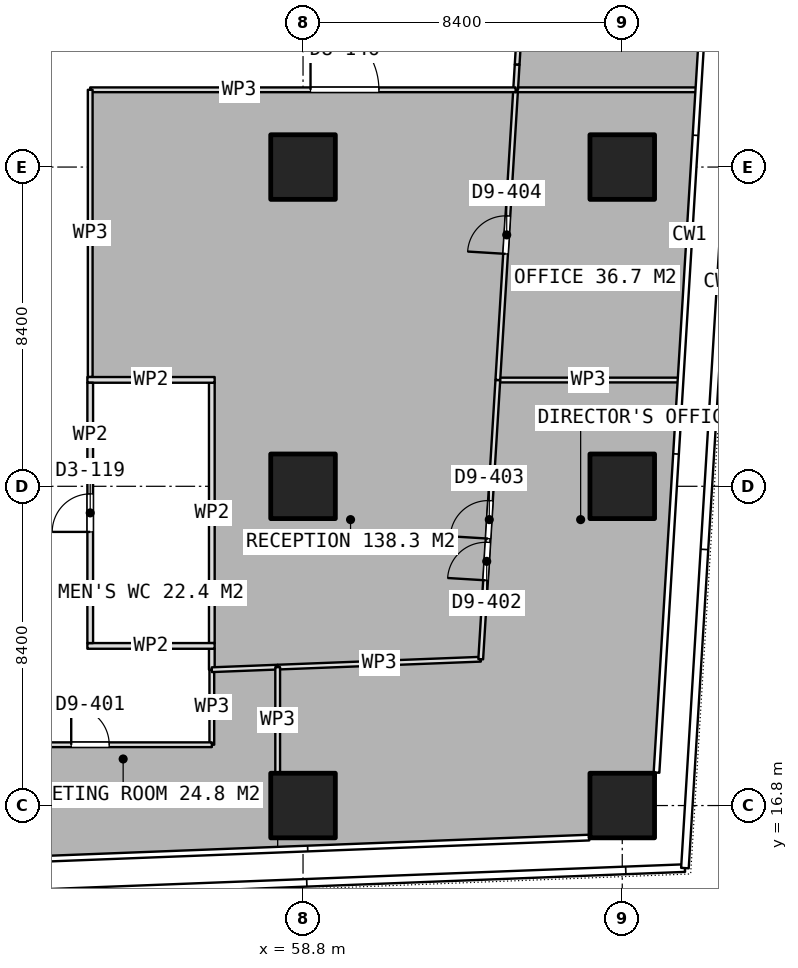
"""IFC4 building model, lengths in metres.
Left out: names, types, materials, properties, quantities, classifications, styles, units other than length and angle.
Written with IfcOpenShell. Run it as: python <this file> out.ifc"""

import sys

from ifc_helpers import new_model, si_unit, direction, frame, frame_2d, origin, origin_2d, place, context, subcontext, project, spatial, rectangle, extrude, element, fill, save


model = new_model("IFC4")
c1 = context("Model", 3, precision=1e-05, world=origin(), true_north=direction((0.0, 1.0)))
c2 = subcontext(c1, "Body", "Model", "MODEL_VIEW")
j1 = project(units=[si_unit("LENGTHUNIT", "METRE"), si_unit("PLANEANGLEUNIT", "RADIAN")], contexts=[c1])
p1 = place(None, origin())
s1 = spatial("IfcSite", under=j1, at=p1, CompositionType="ELEMENT")
p2 = place(p1, origin())
s2 = spatial("IfcBuilding", under=s1, at=p2, CompositionType="ELEMENT")
p3 = place(p2, frame((0.0, 0.0, 114.05)))
s3 = spatial("IfcBuildingStorey", under=s2, at=p3, CompositionType="ELEMENT", Elevation=114.05)
for number, where, z_axis, x_axis in (
    (1, (58.8, 16.8, 0.0), (0.0, 0.0, 1.0), (1.0, 0.0, 0.0)),
    (2, (58.8, 25.2, 0.0), (0.0, 0.0, 1.0), (1.0, 0.0, 0.0)),
    (3, (58.8, 33.6, 0.0), (0.0, 0.0, 1.0), (1.0, 0.0, 0.0)),
    (4, (67.2, 16.8, 0.0), (0.0, 0.0, 1.0), (1.0, 0.0, 0.0)),
    (5, (67.2, 25.2, 0.0), (0.0, 0.0, 1.0), (1.0, 0.0, 0.0)),
    (6, (67.2, 33.6, 0.0), (0.0, 0.0, 1.0), (1.0, 0.0, 0.0)),
):
    element("IfcColumn", number, at=place(p3, frame(where, z_axis=z_axis, x_axis=x_axis)), inside=s3, PredefinedType="COLUMN", context=c2, shape_type="SweptSolid", body=[
        extrude(rectangle(XDim=1.7, YDim=1.7, at=origin_2d()), origin(), (0.0, 0.0, 1.0), 3.75),
    ])
for number, where, z_axis, x_axis in (
    (7, (53.125, 21.0, 0.0), (0.0, 0.0, 1.0), (1.0, 0.0, 0.0)),
    (8, (53.125, 28.0, 0.0), (0.0, 0.0, 1.0), (1.0, 0.0, 0.0)),
):
    element("IfcWall", number, at=place(p3, frame(where, z_axis=z_axis, x_axis=x_axis)), inside=s3, PredefinedType="PARTITIONING", context=c2, shape_type="SweptSolid", body=[
        extrude(rectangle(XDim=3.35, YDim=0.15, at=frame_2d((1.675, 0.0))), origin(), (0.0, 0.0, 1.0), 3.5),
    ])
p4 = place(p3, frame((53.2, 21.075, 0.0), z_axis=(0.0, 0.0, 1.0), x_axis=(0.0, 1.0, 0.0)))
e9 = element("IfcWall", 9, at=p4, inside=s3, PredefinedType="PARTITIONING", context=c2, shape_type="SweptSolid", body=[
    extrude(rectangle(XDim=6.85, YDim=0.15, at=frame_2d((3.425, 0.0))), origin(), (0.0, 0.0, 1.0), 3.5),
])
p5 = place(p4, frame((2.925, 0.0, 0.0)))
e10 = element("IfcOpeningElement", 10, at=p5, cuts=e9, PredefinedType="OPENING", context=c2, shape_type="SweptSolid", body=[
    extrude(rectangle(XDim=1.0, YDim=2.1, at=frame_2d((0.5, 1.05))), frame((0.0, 0.085, 0.0), z_axis=(0.0, -1.0, 0.0), x_axis=(1.0, 0.0, 0.0)), (0.0, 0.0, 1.0), 0.17),
])
p6 = place(p3, frame((56.4, 21.075, 0.0), z_axis=(0.0, 0.0, 1.0), x_axis=(0.0, 1.0, 0.0)))
e11 = element("IfcWall", 11, at=p6, inside=s3, PredefinedType="PARTITIONING", context=c2, shape_type="SweptSolid", body=[
    extrude(rectangle(XDim=6.85, YDim=0.15, at=frame_2d((3.425, 0.0))), origin(), (0.0, 0.0, 1.0), 3.5),
])
p7 = place(p3, frame((56.4, 20.374, 0.0), z_axis=(0.0, 0.0, 1.0), x_axis=(0.999234110548, 0.039130452561, 0.0)))
e12 = element("IfcWall", 12, at=p7, inside=s3, PredefinedType="PARTITIONING", context=c2, shape_type="SweptSolid", body=[
    extrude(rectangle(XDim=1.734, YDim=0.125, at=frame_2d((0.867, 0.0))), origin(), (0.0, 0.0, 1.0), 3.5),
])
p8 = place(p3, frame((58.133, 20.442, 0.0), z_axis=(0.0, 0.0, 1.0), x_axis=(0.0, -1.0, 0.0)))
e13 = element("IfcWall", 13, at=p8, inside=s3, PredefinedType="PARTITIONING", context=c2, shape_type="SweptSolid", body=[
    extrude(rectangle(XDim=2.772, YDim=0.125, at=frame_2d((1.386, 0.0))), origin(), (0.0, 0.0, 1.0), 3.5),
])
p9 = place(p3, frame((50.0, 18.4, 0.0), z_axis=(0.0, 0.0, 1.0), x_axis=(1.0, 0.0, 0.0)))
e14 = element("IfcWall", 14, at=p9, inside=s3, PredefinedType="PARTITIONING", context=c2, shape_type="SweptSolid", body=[
    extrude(rectangle(XDim=6.4, YDim=0.125, at=frame_2d((3.2, 0.0))), origin(), (0.0, 0.0, 1.0), 3.5),
])
p10 = place(p9, frame((2.7, 0.0, 0.0)))
e15 = element("IfcOpeningElement", 15, at=p10, cuts=e14, PredefinedType="OPENING", context=c2, shape_type="SweptSolid", body=[
    extrude(rectangle(XDim=1.0, YDim=2.1, at=frame_2d((0.5, 1.05))), frame((0.0, 0.073, 0.0), z_axis=(0.0, -1.0, 0.0), x_axis=(1.0, 0.0, 0.0)), (0.0, 0.0, 1.0), 0.145),
])
p11 = place(p3, frame((56.4, 18.4, 0.0), z_axis=(0.0, 0.0, 1.0), x_axis=(0.0, 1.0, 0.0)))
e16 = element("IfcWall", 16, at=p11, inside=s3, PredefinedType="PARTITIONING", context=c2, shape_type="SweptSolid", body=[
    extrude(rectangle(XDim=1.974, YDim=0.125, at=frame_2d((0.987, 0.0))), origin(), (0.0, 0.0, 1.0), 3.5),
])
p12 = place(p3, frame((63.926, 27.996, 0.0), z_axis=(0.0, 0.0, 1.0), x_axis=(1.0, 0.0, 0.0)))
e17 = element("IfcWall", 17, at=p12, inside=s3, PredefinedType="PARTITIONING", context=c2, shape_type="SweptSolid", body=[
    extrude(rectangle(XDim=4.758, YDim=0.125, at=frame_2d((2.379, 0.0))), origin(), (0.0, 0.0, 1.0), 3.5),
])
p13 = place(p3, frame((58.134, 20.442, 0.0), z_axis=(0.0, 0.0, 1.0), x_axis=(0.999242781249, 0.03890840682, 0.0)))
e18 = element("IfcWall", 18, at=p13, inside=s3, PredefinedType="PARTITIONING", context=c2, shape_type="SweptSolid", body=[
    extrude(rectangle(XDim=5.346, YDim=0.125, at=frame_2d((2.673, 0.0))), origin(), (0.0, 0.0, 1.0), 3.5),
])
p14 = place(p3, frame((63.476, 20.65, 0.0), z_axis=(0.0, 0.0, 1.0), x_axis=(0.061135017565, 0.998129505439, 0.0)))
e19 = element("IfcWall", 19, at=p14, inside=s3, PredefinedType="PARTITIONING", context=c2, shape_type="SweptSolid", body=[
    extrude(rectangle(XDim=7.36, YDim=0.125, at=frame_2d((3.68, 0.0))), origin(), (0.0, 0.0, 1.0), 3.5),
])
p15 = place(p14, frame((3.18, 0.0, 0.0)))
e20 = element("IfcOpeningElement", 20, at=p15, cuts=e19, PredefinedType="OPENING", context=c2, shape_type="SweptSolid", body=[
    extrude(rectangle(XDim=1.0, YDim=2.1, at=frame_2d((0.5, 1.05))), frame((0.0, 0.073, 0.0), z_axis=(0.0, -1.0, 0.0), x_axis=(1.0, 0.0, 0.0)), (0.0, 0.0, 1.0), 0.145),
])
p16 = place(p14, frame((2.08, 0.0, 0.0)))
e21 = element("IfcOpeningElement", 21, at=p16, cuts=e19, PredefinedType="OPENING", context=c2, shape_type="SweptSolid", body=[
    extrude(rectangle(XDim=1.0, YDim=2.1, at=frame_2d((0.5, 1.05))), frame((0.0, 0.073, 0.0), z_axis=(0.0, -1.0, 0.0), x_axis=(1.0, 0.0, 0.0)), (0.0, 0.0, 1.0), 0.145),
])
p17 = place(p3, frame((63.926, 27.997, 0.0), z_axis=(0.0, 0.0, 1.0), x_axis=(0.061176245149, 0.998126979412, 0.0)))
e22 = element("IfcWall", 22, at=p17, inside=s3, PredefinedType="PARTITIONING", context=c2, shape_type="SweptSolid", body=[
    extrude(rectangle(XDim=7.65, YDim=0.125, at=frame_2d((3.825, 0.0))), origin(), (0.0, 0.0, 1.0), 3.5),
])
p18 = place(p17, frame((3.325, 0.0, 0.0)))
e23 = element("IfcOpeningElement", 23, at=p18, cuts=e22, PredefinedType="OPENING", context=c2, shape_type="SweptSolid", body=[
    extrude(rectangle(XDim=1.0, YDim=2.1, at=frame_2d((0.5, 1.05))), frame((0.0, 0.073, 0.0), z_axis=(0.0, -1.0, 0.0), x_axis=(1.0, 0.0, 0.0)), (0.0, 0.0, 1.0), 0.145),
])
p19 = place(p3, frame((64.394, 35.633, 0.0), z_axis=(0.0, 0.0, 1.0), x_axis=(1.0, 0.0, 0.0)))
e24 = element("IfcWall", 24, at=p19, inside=s3, PredefinedType="PARTITIONING", context=c2, shape_type="SweptSolid", body=[
    extrude(rectangle(XDim=4.758, YDim=0.125, at=frame_2d((2.379, 0.0))), origin(), (0.0, 0.0, 1.0), 3.5),
])
p20 = place(p3, frame((64.434, 36.293, 0.0), z_axis=(0.0, 0.0, 1.0), x_axis=(0.060919506416, 0.998142682054, 0.0)))
e25 = element("IfcWall", 25, at=p20, inside=s3, PredefinedType="PARTITIONING", context=c2, shape_type="SweptSolid", body=[
    extrude(rectangle(XDim=1.146, YDim=0.125, at=frame_2d((0.573, 0.0))), origin(), (0.0, 0.0, 1.0), 3.5),
])
p21 = place(p3, frame((64.394, 35.634, 0.0), z_axis=(0.0, 0.0, 1.0), x_axis=(0.060651381141, 0.998159010361, 0.0)))
e26 = element("IfcWall", 26, at=p21, inside=s3, PredefinedType="PARTITIONING", context=c2, shape_type="SweptSolid", body=[
    extrude(rectangle(XDim=0.66, YDim=0.125, at=frame_2d((0.33, 0.0))), origin(), (0.0, 0.0, 1.0), 3.5),
])
p22 = place(p3, frame((53.2, 35.633, 0.0), z_axis=(0.0, 0.0, 1.0), x_axis=(1.0, 0.0, 0.0)))
e27 = element("IfcWall", 27, at=p22, inside=s3, PredefinedType="PARTITIONING", context=c2, shape_type="SweptSolid", body=[
    extrude(rectangle(XDim=11.194, YDim=0.125, at=frame_2d((5.597, 0.0))), origin(), (0.0, 0.0, 1.0), 3.5),
])
p23 = place(p22, frame((5.797, 0.0, 0.0)))
e28 = element("IfcOpeningElement", 28, at=p23, cuts=e27, PredefinedType="OPENING", context=c2, shape_type="SweptSolid", body=[
    extrude(rectangle(XDim=1.8, YDim=2.1, at=frame_2d((0.9, 1.05))), frame((0.0, 0.073, 0.0), z_axis=(0.0, -1.0, 0.0), x_axis=(1.0, 0.0, 0.0)), (0.0, 0.0, 1.0), 0.145),
])
p24 = place(p3, frame((53.2, 28.075, 0.0), z_axis=(0.0, 0.0, 1.0), x_axis=(0.0, 1.0, 0.0)))
e29 = element("IfcWall", 29, at=p24, inside=s3, PredefinedType="PARTITIONING", context=c2, shape_type="SweptSolid", body=[
    extrude(rectangle(XDim=7.558, YDim=0.125, at=frame_2d((3.779, 0.0))), origin(), (0.0, 0.0, 1.0), 3.5),
])
p25 = place(p3, frame((56.4, 20.374, 0.0), z_axis=(0.0, 0.0, 1.0), x_axis=(0.0, 1.0, 0.0)))
e30 = element("IfcWall", 30, at=p25, inside=s3, PredefinedType="PARTITIONING", context=c2, shape_type="SweptSolid", body=[
    extrude(rectangle(XDim=0.551, YDim=0.15, at=frame_2d((0.275, 0.0))), origin(), (0.0, 0.0, 1.0), 3.5),
])
p26 = place(p5, origin())
e31 = element("IfcDoor", 31, at=p26, inside=s3, OperationType="SINGLE_SWING_LEFT", PredefinedType="DOOR", context=c2, shape_type="SweptSolid", body=[
    extrude(rectangle(XDim=1.0, YDim=2.1, at=frame_2d((0.5, 1.05))), frame((0.0, 0.025, 0.0), z_axis=(0.0, -1.0, 0.0), x_axis=(1.0, 0.0, 0.0)), (0.0, 0.0, 1.0), 0.05),
])
fill(e10, e31)
p27 = place(p10, origin())
e32 = element("IfcDoor", 32, at=p27, inside=s3, OperationType="SINGLE_SWING_LEFT", PredefinedType="DOOR", context=c2, shape_type="SweptSolid", body=[
    extrude(rectangle(XDim=1.0, YDim=2.1, at=frame_2d((0.5, 1.05))), frame((0.0, 0.025, 0.0), z_axis=(0.0, -1.0, 0.0), x_axis=(1.0, 0.0, 0.0)), (0.0, 0.0, 1.0), 0.05),
])
fill(e15, e32)
p28 = place(p15, origin())
e33 = element("IfcDoor", 33, at=p28, inside=s3, OperationType="SINGLE_SWING_LEFT", PredefinedType="DOOR", context=c2, shape_type="SweptSolid", body=[
    extrude(rectangle(XDim=1.0, YDim=2.1, at=frame_2d((0.5, 1.05))), frame((0.0, 0.025, 0.0), z_axis=(0.0, -1.0, 0.0), x_axis=(1.0, 0.0, 0.0)), (0.0, 0.0, 1.0), 0.05),
])
fill(e20, e33)
p29 = place(p23, origin())
e34 = element("IfcDoor", 34, at=p29, inside=s3, OperationType="DOUBLE_DOOR_SINGLE_SWING", PredefinedType="DOOR", context=c2, shape_type="SweptSolid", body=[
    extrude(rectangle(XDim=1.8, YDim=2.1, at=frame_2d((0.9, 1.05))), frame((0.0, 0.025, 0.0), z_axis=(0.0, -1.0, 0.0), x_axis=(1.0, 0.0, 0.0)), (0.0, 0.0, 1.0), 0.05),
])
fill(e28, e34)
p30 = place(p18, origin())
e35 = element("IfcDoor", 35, at=p30, inside=s3, OperationType="SINGLE_SWING_LEFT", PredefinedType="DOOR", context=c2, shape_type="SweptSolid", body=[
    extrude(rectangle(XDim=1.0, YDim=2.1, at=frame_2d((0.5, 1.05))), frame((0.0, 0.025, 0.0), z_axis=(0.0, -1.0, 0.0), x_axis=(1.0, 0.0, 0.0)), (0.0, 0.0, 1.0), 0.05),
])
fill(e23, e35)
p31 = place(p16, origin())
e36 = element("IfcDoor", 36, at=p31, inside=s3, OperationType="SINGLE_SWING_LEFT", PredefinedType="DOOR", context=c2, shape_type="SweptSolid", body=[
    extrude(rectangle(XDim=1.0, YDim=2.1, at=frame_2d((0.5, 1.05))), frame((0.0, 0.025, 0.0), z_axis=(0.0, -1.0, 0.0), x_axis=(1.0, 0.0, 0.0)), (0.0, 0.0, 1.0), 0.05),
])
fill(e21, e36)
save(model, sys.argv[1])
